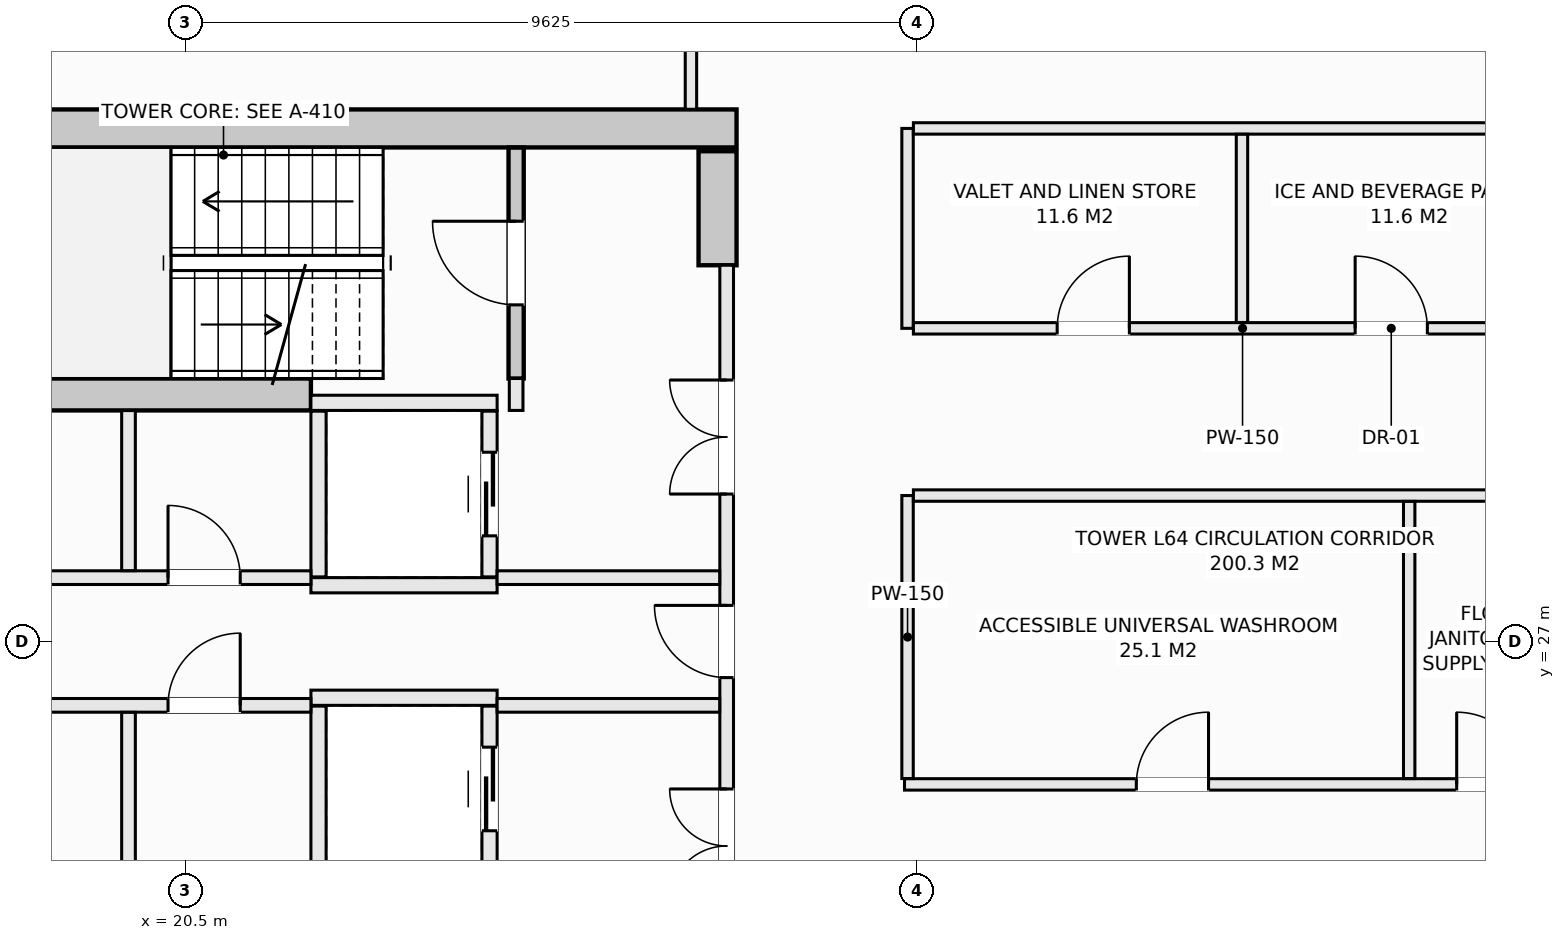
"""IFC4 building model, lengths in metres.
Left out: names, types, materials, properties, quantities, classifications, styles, units other than length and angle.
Written with IfcOpenShell. Run it as: python <this file> out.ifc"""

import sys

from ifc_helpers import new_model, si_unit, direction, frame, frame_2d, origin, place, context, subcontext, project, spatial, rectangle, extrude, element, fill, save


model = new_model("IFC4")
c1 = context("Model", 3, precision=1e-05, world=origin(), true_north=direction((0.0, 1.0)))
c2 = subcontext(c1, "Body", "Model", "MODEL_VIEW")
j1 = project(units=[si_unit("LENGTHUNIT", "METRE"), si_unit("PLANEANGLEUNIT", "RADIAN")], contexts=[c1])
p1 = place(None, origin())
s1 = spatial("IfcSite", under=j1, at=p1, CompositionType="ELEMENT")
p2 = place(p1, origin())
s2 = spatial("IfcBuilding", under=s1, at=p2, CompositionType="ELEMENT")
p3 = place(p2, frame((0.0, 0.0, 239.3)))
s3 = spatial("IfcBuildingStorey", under=s2, at=p3, CompositionType="ELEMENT", Elevation=239.3)
p4 = place(p3, frame((14.25, 33.75, -0.27), z_axis=(0.0, 0.0, 1.0), x_axis=(1.0, 0.0, 0.0)))
e1 = element("IfcWall", 1, at=p4, inside=s3, PredefinedType="SHEAR", context=c2, shape_type="SweptSolid", body=[
    extrude(rectangle(XDim=13.5, YDim=0.5, at=frame_2d((6.75, 0.0))), origin(), (0.0, 0.0, 1.0), 3.3),
])
p5 = place(p3, frame((27.5, 31.95, -0.27), z_axis=(0.0, 0.0, 1.0), x_axis=(0.0, 1.0, 0.0)))
e2 = element("IfcWall", 2, at=p5, inside=s3, PredefinedType="SHEAR", context=c2, shape_type="SweptSolid", body=[
    extrude(rectangle(XDim=1.5, YDim=0.5, at=frame_2d((0.75, 0.0))), origin(), (0.0, 0.0, 1.0), 3.3),
])
p6 = place(p3, frame((14.85, 30.25, -0.27), z_axis=(0.0, 0.0, 1.0), x_axis=(1.0, 0.0, 0.0)))
e3 = element("IfcWall", 3, at=p6, inside=s3, PredefinedType="SHEAR", context=c2, shape_type="SweptSolid", body=[
    extrude(rectangle(XDim=7.3, YDim=0.42, at=frame_2d((3.65, 0.0))), origin(), (0.0, 0.0, 1.0), 3.3),
])
p7 = place(p3, frame((24.85, 30.46, -0.27), z_axis=(0.0, 0.0, 1.0), x_axis=(0.0, 1.0, 0.0)))
e4 = element("IfcWall", 4, at=p7, inside=s3, PredefinedType="SHEAR", context=c2, shape_type="SweptSolid", body=[
    extrude(rectangle(XDim=3.038, YDim=0.2, at=frame_2d((1.519, 0.0))), origin(), (0.0, 0.0, 1.0), 3.3),
])
p8 = place(p7, frame((0.969, 0.0, 0.27)))
e5 = element("IfcOpeningElement", 5, at=p8, cuts=e4, PredefinedType="OPENING", context=c2, shape_type="SweptSolid", body=[
    extrude(rectangle(XDim=1.1, YDim=2.15, at=frame_2d((0.55, 1.075))), frame((0.0, 0.11, 0.0), z_axis=(0.0, -1.0, 0.0), x_axis=(1.0, 0.0, 0.0)), (0.0, 0.0, 1.0), 0.22),
])
for number, where, z_axis, x_axis in (
    (6, (22.15, 30.14, 0.0), (0.0, 0.0, 1.0), (1.0, 0.0, 0.0)),
    (7, (22.15, 27.74, 0.0), (0.0, 0.0, 1.0), (1.0, 0.0, 0.0)),
):
    element("IfcWall", number, at=place(p3, frame(where, z_axis=z_axis, x_axis=x_axis)), inside=s3, PredefinedType="SOLIDWALL", context=c2, shape_type="SweptSolid", body=[
        extrude(rectangle(XDim=2.45, YDim=0.2, at=frame_2d((1.225, 0.0))), origin(), (0.0, 0.0, 1.0), 3.03),
    ])
p9 = place(p3, frame((22.25, 27.85, 0.0), z_axis=(0.0, 0.0, 1.0), x_axis=(0.0, 1.0, 0.0)))
e8 = element("IfcWall", 8, at=p9, inside=s3, PredefinedType="SOLIDWALL", context=c2, shape_type="SweptSolid", body=[
    extrude(rectangle(XDim=2.18, YDim=0.2, at=frame_2d((1.09, 0.0))), origin(), (0.0, 0.0, 1.0), 3.03),
])
p10 = place(p3, frame((24.5, 27.85, 0.0), z_axis=(0.0, 0.0, 1.0), x_axis=(0.0, 1.0, 0.0)))
e9 = element("IfcWall", 9, at=p10, inside=s3, PredefinedType="SOLIDWALL", context=c2, shape_type="SweptSolid", body=[
    extrude(rectangle(XDim=2.18, YDim=0.2, at=frame_2d((1.09, 0.0))), origin(), (0.0, 0.0, 1.0), 3.03),
])
p11 = place(p10, frame((0.54, 0.0, 0.0)))
e10 = element("IfcOpeningElement", 10, at=p11, cuts=e9, PredefinedType="OPENING", context=c2, shape_type="SweptSolid", body=[
    extrude(rectangle(XDim=1.1, YDim=2.2, at=frame_2d((0.55, 1.1))), frame((0.0, 0.11, 0.0), z_axis=(0.0, -1.0, 0.0), x_axis=(1.0, 0.0, 0.0)), (0.0, 0.0, 1.0), 0.22),
])
p12 = place(p3, frame((22.15, 26.26, 0.0), z_axis=(0.0, 0.0, 1.0), x_axis=(1.0, 0.0, 0.0)))
e11 = element("IfcWall", 11, at=p12, inside=s3, PredefinedType="SOLIDWALL", context=c2, shape_type="SweptSolid", body=[
    extrude(rectangle(XDim=2.45, YDim=0.2, at=frame_2d((1.225, 0.0))), origin(), (0.0, 0.0, 1.0), 3.03),
])
p13 = place(p3, frame((22.25, 23.97, 0.0), z_axis=(0.0, 0.0, 1.0), x_axis=(0.0, 1.0, 0.0)))
e12 = element("IfcWall", 12, at=p13, inside=s3, PredefinedType="SOLIDWALL", context=c2, shape_type="SweptSolid", body=[
    extrude(rectangle(XDim=2.18, YDim=0.2, at=frame_2d((1.09, 0.0))), origin(), (0.0, 0.0, 1.0), 3.03),
])
p14 = place(p3, frame((24.5, 23.97, 0.0), z_axis=(0.0, 0.0, 1.0), x_axis=(0.0, 1.0, 0.0)))
e13 = element("IfcWall", 13, at=p14, inside=s3, PredefinedType="SOLIDWALL", context=c2, shape_type="SweptSolid", body=[
    extrude(rectangle(XDim=2.18, YDim=0.2, at=frame_2d((1.09, 0.0))), origin(), (0.0, 0.0, 1.0), 3.03),
])
p15 = place(p14, frame((0.54, 0.0, 0.0)))
e14 = element("IfcOpeningElement", 14, at=p15, cuts=e13, PredefinedType="OPENING", context=c2, shape_type="SweptSolid", body=[
    extrude(rectangle(XDim=1.1, YDim=2.2, at=frame_2d((0.55, 1.1))), frame((0.0, 0.11, 0.0), z_axis=(0.0, -1.0, 0.0), x_axis=(1.0, 0.0, 0.0)), (0.0, 0.0, 1.0), 0.22),
])
p16 = place(p3, frame((24.85, 30.04, 0.0), z_axis=(0.0, 0.0, 1.0), x_axis=(0.0, 1.0, 0.0)))
e15 = element("IfcWall", 15, at=p16, inside=s3, PredefinedType="SOLIDWALL", context=c2, shape_type="SweptSolid", body=[
    extrude(rectangle(XDim=0.42, YDim=0.18, at=frame_2d((0.21, 0.0))), origin(), (0.0, 0.0, 1.0), 3.03),
])
p17 = place(p3, frame((27.62, 22.05, 0.0), z_axis=(0.0, 0.0, 1.0), x_axis=(0.0, 1.0, 0.0)))
e16 = element("IfcWall", 16, at=p17, inside=s3, PredefinedType="SOLIDWALL", context=c2, shape_type="SweptSolid", body=[
    extrude(rectangle(XDim=9.9, YDim=0.18, at=frame_2d((4.95, 0.0))), origin(), (0.0, 0.0, 1.0), 3.03),
])
p18 = place(p17, frame((4.475, 0.0, 0.0)))
e17 = element("IfcOpeningElement", 17, at=p18, cuts=e16, PredefinedType="OPENING", context=c2, shape_type="SweptSolid", body=[
    extrude(rectangle(XDim=0.95, YDim=2.1, at=frame_2d((0.475, 1.05))), frame((0.0, 0.1, 0.0), z_axis=(0.0, -1.0, 0.0), x_axis=(1.0, 0.0, 0.0)), (0.0, 0.0, 1.0), 0.2),
])
p19 = place(p17, frame((6.89, 0.0, 0.0)))
e18 = element("IfcOpeningElement", 18, at=p19, cuts=e16, PredefinedType="OPENING", context=c2, shape_type="SweptSolid", body=[
    extrude(rectangle(XDim=1.5, YDim=2.2, at=frame_2d((0.75, 1.1))), frame((0.0, 0.1, 0.0), z_axis=(0.0, -1.0, 0.0), x_axis=(1.0, 0.0, 0.0)), (0.0, 0.0, 1.0), 0.2),
])
p20 = place(p17, frame((1.51, 0.0, 0.0)))
e19 = element("IfcOpeningElement", 19, at=p20, cuts=e16, PredefinedType="OPENING", context=c2, shape_type="SweptSolid", body=[
    extrude(rectangle(XDim=1.5, YDim=2.2, at=frame_2d((0.75, 1.1))), frame((0.0, 0.1, 0.0), z_axis=(0.0, -1.0, 0.0), x_axis=(1.0, 0.0, 0.0)), (0.0, 0.0, 1.0), 0.2),
])
p21 = place(p3, frame((15.25, 27.84, 0.0), z_axis=(0.0, 0.0, 1.0), x_axis=(1.0, 0.0, 0.0)))
e20 = element("IfcWall", 20, at=p21, inside=s3, PredefinedType="SOLIDWALL", context=c2, shape_type="SweptSolid", body=[
    extrude(rectangle(XDim=6.9, YDim=0.18, at=frame_2d((3.45, 0.0))), origin(), (0.0, 0.0, 1.0), 3.03),
])
p22 = place(p21, frame((5.02, 0.0, 0.0)))
e21 = element("IfcOpeningElement", 21, at=p22, cuts=e20, PredefinedType="OPENING", context=c2, shape_type="SweptSolid", body=[
    extrude(rectangle(XDim=0.95, YDim=2.1, at=frame_2d((0.475, 1.05))), frame((0.0, 0.1, 0.0), z_axis=(0.0, -1.0, 0.0), x_axis=(1.0, 0.0, 0.0)), (0.0, 0.0, 1.0), 0.2),
])
p23 = place(p21, frame((1.98, 0.0, 0.0)))
e22 = element("IfcOpeningElement", 22, at=p23, cuts=e20, PredefinedType="OPENING", context=c2, shape_type="SweptSolid", body=[
    extrude(rectangle(XDim=0.95, YDim=2.1, at=frame_2d((0.475, 1.05))), frame((0.0, 0.1, 0.0), z_axis=(0.0, -1.0, 0.0), x_axis=(1.0, 0.0, 0.0)), (0.0, 0.0, 1.0), 0.2),
])
p24 = place(p3, frame((24.6, 27.84, 0.0), z_axis=(0.0, 0.0, 1.0), x_axis=(1.0, 0.0, 0.0)))
e23 = element("IfcWall", 23, at=p24, inside=s3, PredefinedType="SOLIDWALL", context=c2, shape_type="SweptSolid", body=[
    extrude(rectangle(XDim=2.928, YDim=0.18, at=frame_2d((1.464, 0.0))), origin(), (0.0, 0.0, 1.0), 3.03),
])
p25 = place(p3, frame((15.25, 26.16, 0.0), z_axis=(0.0, 0.0, 1.0), x_axis=(1.0, 0.0, 0.0)))
e24 = element("IfcWall", 24, at=p25, inside=s3, PredefinedType="SOLIDWALL", context=c2, shape_type="SweptSolid", body=[
    extrude(rectangle(XDim=6.9, YDim=0.18, at=frame_2d((3.45, 0.0))), origin(), (0.0, 0.0, 1.0), 3.03),
])
p26 = place(p25, frame((5.02, 0.0, 0.0)))
e25 = element("IfcOpeningElement", 25, at=p26, cuts=e24, PredefinedType="OPENING", context=c2, shape_type="SweptSolid", body=[
    extrude(rectangle(XDim=0.95, YDim=2.1, at=frame_2d((0.475, 1.05))), frame((0.0, 0.1, 0.0), z_axis=(0.0, -1.0, 0.0), x_axis=(1.0, 0.0, 0.0)), (0.0, 0.0, 1.0), 0.2),
])
p27 = place(p25, frame((1.98, 0.0, 0.0)))
e26 = element("IfcOpeningElement", 26, at=p27, cuts=e24, PredefinedType="OPENING", context=c2, shape_type="SweptSolid", body=[
    extrude(rectangle(XDim=0.95, YDim=2.1, at=frame_2d((0.475, 1.05))), frame((0.0, 0.1, 0.0), z_axis=(0.0, -1.0, 0.0), x_axis=(1.0, 0.0, 0.0)), (0.0, 0.0, 1.0), 0.2),
])
p28 = place(p3, frame((24.6, 26.16, 0.0), z_axis=(0.0, 0.0, 1.0), x_axis=(1.0, 0.0, 0.0)))
e27 = element("IfcWall", 27, at=p28, inside=s3, PredefinedType="SOLIDWALL", context=c2, shape_type="SweptSolid", body=[
    extrude(rectangle(XDim=2.928, YDim=0.18, at=frame_2d((1.464, 0.0))), origin(), (0.0, 0.0, 1.0), 3.03),
])
for number, where, z_axis, x_axis in (
    (28, (19.75, 23.962, 0.0), (0.0, 0.0, 1.0), (0.0, 1.0, 0.0)),
    (29, (19.75, 27.932, 0.0), (0.0, 0.0, 1.0), (0.0, 1.0, 0.0)),
):
    element("IfcWall", number, at=place(p3, frame(where, z_axis=z_axis, x_axis=x_axis)), inside=s3, PredefinedType="SOLIDWALL", context=c2, shape_type="SweptSolid", body=[
        extrude(rectangle(XDim=2.106, YDim=0.18, at=frame_2d((1.053, 0.0))), origin(), (0.0, 0.0, 1.0), 3.03),
    ])
p29 = place(p3, frame((27.15, 34.002, 0.0), z_axis=(0.0, 0.0, 1.0), x_axis=(0.0, 1.0, 0.0)))
e30 = element("IfcWall", 30, at=p29, inside=s3, PredefinedType="PARTITIONING", context=c2, shape_type="SweptSolid", body=[
    extrude(rectangle(XDim=4.198, YDim=0.15, at=frame_2d((2.099, 0.0))), origin(), (0.0, 0.0, 1.0), 3.03),
])
p30 = place(p29, frame((1.998, 0.0, 0.0)))
e31 = element("IfcOpeningElement", 31, at=p30, cuts=e30, PredefinedType="OPENING", context=c2, shape_type="SweptSolid", body=[
    extrude(rectangle(XDim=0.95, YDim=2.1, at=frame_2d((0.475, 1.05))), frame((0.0, 0.085, 0.0), z_axis=(0.0, -1.0, 0.0), x_axis=(1.0, 0.0, 0.0)), (0.0, 0.0, 1.0), 0.17),
])
p31 = place(p3, frame((29.96, 25.12, 0.0), z_axis=(0.0, 0.0, 1.0), x_axis=(1.0, 0.0, 0.0)))
e32 = element("IfcWall", 32, at=p31, inside=s3, PredefinedType="PARTITIONING", context=c2, shape_type="SweptSolid", body=[
    extrude(rectangle(XDim=9.64, YDim=0.15, at=frame_2d((4.82, 0.0))), origin(), (0.0, 0.0, 1.0), 3.03),
])
p32 = place(p31, frame((3.05, 0.0, 0.0)))
e33 = element("IfcOpeningElement", 33, at=p32, cuts=e32, PredefinedType="OPENING", context=c2, shape_type="SweptSolid", body=[
    extrude(rectangle(XDim=0.95, YDim=2.1, at=frame_2d((0.475, 1.05))), frame((0.0, 0.085, 0.0), z_axis=(0.0, -1.0, 0.0), x_axis=(1.0, 0.0, 0.0)), (0.0, 0.0, 1.0), 0.17),
])
p33 = place(p31, frame((7.265, 0.0, 0.0)))
e34 = element("IfcOpeningElement", 34, at=p33, cuts=e32, PredefinedType="OPENING", context=c2, shape_type="SweptSolid", body=[
    extrude(rectangle(XDim=0.95, YDim=2.1, at=frame_2d((0.475, 1.05))), frame((0.0, 0.085, 0.0), z_axis=(0.0, -1.0, 0.0), x_axis=(1.0, 0.0, 0.0)), (0.0, 0.0, 1.0), 0.17),
])
p34 = place(p3, frame((30.0, 25.197, 0.0), z_axis=(0.0, 0.0, 1.0), x_axis=(0.0, 1.0, 0.0)))
e35 = element("IfcWall", 35, at=p34, inside=s3, PredefinedType="PARTITIONING", context=c2, shape_type="SweptSolid", body=[
    extrude(rectangle(XDim=3.723, YDim=0.15, at=frame_2d((1.861, 0.0))), origin(), (0.0, 0.0, 1.0), 3.03),
])
p35 = place(p3, frame((30.0, 31.12, 0.0), z_axis=(0.0, 0.0, 1.0), x_axis=(0.0, 1.0, 0.0)))
e36 = element("IfcWall", 36, at=p35, inside=s3, PredefinedType="PARTITIONING", context=c2, shape_type="SweptSolid", body=[
    extrude(rectangle(XDim=2.63, YDim=0.15, at=frame_2d((1.315, 0.0))), origin(), (0.0, 0.0, 1.0), 3.03),
])
p36 = place(p3, frame((30.077, 28.92, 0.0), z_axis=(0.0, 0.0, 1.0), x_axis=(1.0, 0.0, 0.0)))
e37 = element("IfcWall", 37, at=p36, inside=s3, PredefinedType="PARTITIONING", context=c2, shape_type="SweptSolid", body=[
    extrude(rectangle(XDim=9.523, YDim=0.15, at=frame_2d((4.762, 0.0))), origin(), (0.0, 0.0, 1.0), 3.03),
])
p37 = place(p3, frame((36.6, 25.197, 0.0), z_axis=(0.0, 0.0, 1.0), x_axis=(0.0, 1.0, 0.0)))
e38 = element("IfcWall", 38, at=p37, inside=s3, PredefinedType="PARTITIONING", context=c2, shape_type="SweptSolid", body=[
    extrude(rectangle(XDim=3.646, YDim=0.15, at=frame_2d((1.823, 0.0))), origin(), (0.0, 0.0, 1.0), 3.03),
])
p38 = place(p3, frame((30.077, 31.12, 0.0), z_axis=(0.0, 0.0, 1.0), x_axis=(1.0, 0.0, 0.0)))
e39 = element("IfcWall", 39, at=p38, inside=s3, PredefinedType="PARTITIONING", context=c2, shape_type="SweptSolid", body=[
    extrude(rectangle(XDim=8.661, YDim=0.15, at=frame_2d((4.331, 0.0))), origin(), (0.0, 0.0, 1.0), 3.03),
])
p39 = place(p38, frame((1.892, 0.0, 0.0)))
e40 = element("IfcOpeningElement", 40, at=p39, cuts=e39, PredefinedType="OPENING", context=c2, shape_type="SweptSolid", body=[
    extrude(rectangle(XDim=0.95, YDim=2.1, at=frame_2d((0.475, 1.05))), frame((0.0, 0.085, 0.0), z_axis=(0.0, -1.0, 0.0), x_axis=(1.0, 0.0, 0.0)), (0.0, 0.0, 1.0), 0.17),
])
p40 = place(p38, frame((5.812, 0.0, 0.0)))
e41 = element("IfcOpeningElement", 41, at=p40, cuts=e39, PredefinedType="OPENING", context=c2, shape_type="SweptSolid", body=[
    extrude(rectangle(XDim=0.95, YDim=2.1, at=frame_2d((0.475, 1.05))), frame((0.0, 0.085, 0.0), z_axis=(0.0, -1.0, 0.0), x_axis=(1.0, 0.0, 0.0)), (0.0, 0.0, 1.0), 0.17),
])
p41 = place(p3, frame((30.077, 33.75, 0.0), z_axis=(0.0, 0.0, 1.0), x_axis=(1.0, 0.0, 0.0)))
e42 = element("IfcWall", 42, at=p41, inside=s3, PredefinedType="PARTITIONING", context=c2, shape_type="SweptSolid", body=[
    extrude(rectangle(XDim=8.661, YDim=0.15, at=frame_2d((4.331, 0.0))), origin(), (0.0, 0.0, 1.0), 3.03),
])
p42 = place(p3, frame((34.4, 31.197, 0.0), z_axis=(0.0, 0.0, 1.0), x_axis=(0.0, 1.0, 0.0)))
e43 = element("IfcWall", 43, at=p42, inside=s3, PredefinedType="PARTITIONING", context=c2, shape_type="SweptSolid", body=[
    extrude(rectangle(XDim=2.476, YDim=0.15, at=frame_2d((1.238, 0.0))), origin(), (0.0, 0.0, 1.0), 3.03),
])
p43 = place(p8, origin())
e44 = element("IfcDoor", 44, at=p43, inside=s3, OperationType="SINGLE_SWING_RIGHT", PredefinedType="DOOR", context=c2, shape_type="SweptSolid", body=[
    extrude(rectangle(XDim=1.1, YDim=2.15, at=frame_2d((0.55, 1.075))), frame((0.0, 0.025, 0.0), z_axis=(0.0, -1.0, 0.0), x_axis=(1.0, 0.0, 0.0)), (0.0, 0.0, 1.0), 0.05),
])
fill(e5, e44)
p44 = place(p11, origin())
e45 = element("IfcDoor", 45, at=p44, inside=s3, OperationType="SLIDING_TO_LEFT", PredefinedType="DOOR", context=c2, shape_type="SweptSolid", body=[
    extrude(rectangle(XDim=1.1, YDim=2.2, at=frame_2d((0.55, 1.1))), frame((0.0, 0.025, 0.0), z_axis=(0.0, -1.0, 0.0), x_axis=(1.0, 0.0, 0.0)), (0.0, 0.0, 1.0), 0.05),
])
fill(e10, e45)
p45 = place(p15, origin())
e46 = element("IfcDoor", 46, at=p45, inside=s3, OperationType="SLIDING_TO_LEFT", PredefinedType="DOOR", context=c2, shape_type="SweptSolid", body=[
    extrude(rectangle(XDim=1.1, YDim=2.2, at=frame_2d((0.55, 1.1))), frame((0.0, 0.025, 0.0), z_axis=(0.0, -1.0, 0.0), x_axis=(1.0, 0.0, 0.0)), (0.0, 0.0, 1.0), 0.05),
])
fill(e14, e46)
p46 = place(p18, origin())
e47 = element("IfcDoor", 47, at=p46, inside=s3, OperationType="SINGLE_SWING_RIGHT", PredefinedType="DOOR", context=c2, shape_type="SweptSolid", body=[
    extrude(rectangle(XDim=0.95, YDim=2.1, at=frame_2d((0.475, 1.05))), frame((0.0, 0.025, 0.0), z_axis=(0.0, -1.0, 0.0), x_axis=(1.0, 0.0, 0.0)), (0.0, 0.0, 1.0), 0.05),
])
fill(e17, e47)
p47 = place(p19, origin())
e48 = element("IfcDoor", 48, at=p47, inside=s3, OperationType="DOUBLE_DOOR_SINGLE_SWING", PredefinedType="DOOR", context=c2, shape_type="SweptSolid", body=[
    extrude(rectangle(XDim=1.5, YDim=2.2, at=frame_2d((0.75, 1.1))), frame((0.0, 0.025, 0.0), z_axis=(0.0, -1.0, 0.0), x_axis=(1.0, 0.0, 0.0)), (0.0, 0.0, 1.0), 0.05),
])
fill(e18, e48)
p48 = place(p20, origin())
e49 = element("IfcDoor", 49, at=p48, inside=s3, OperationType="DOUBLE_DOOR_SINGLE_SWING", PredefinedType="DOOR", context=c2, shape_type="SweptSolid", body=[
    extrude(rectangle(XDim=1.5, YDim=2.2, at=frame_2d((0.75, 1.1))), frame((0.0, 0.025, 0.0), z_axis=(0.0, -1.0, 0.0), x_axis=(1.0, 0.0, 0.0)), (0.0, 0.0, 1.0), 0.05),
])
fill(e19, e49)
p49 = place(p22, origin())
e50 = element("IfcDoor", 50, at=p49, inside=s3, OperationType="SINGLE_SWING_LEFT", PredefinedType="DOOR", context=c2, shape_type="SweptSolid", body=[
    extrude(rectangle(XDim=0.95, YDim=2.1, at=frame_2d((0.475, 1.05))), frame((0.0, 0.025, 0.0), z_axis=(0.0, -1.0, 0.0), x_axis=(1.0, 0.0, 0.0)), (0.0, 0.0, 1.0), 0.05),
])
fill(e21, e50)
p50 = place(p26, origin())
e51 = element("IfcDoor", 51, at=p50, inside=s3, OperationType="SINGLE_SWING_RIGHT", PredefinedType="DOOR", context=c2, shape_type="SweptSolid", body=[
    extrude(rectangle(XDim=0.95, YDim=2.1, at=frame_2d((0.475, 1.05))), frame((0.0, 0.025, 0.0), z_axis=(0.0, -1.0, 0.0), x_axis=(1.0, 0.0, 0.0)), (0.0, 0.0, 1.0), 0.05),
])
fill(e25, e51)
p51 = place(p32, origin())
e52 = element("IfcDoor", 52, at=p51, inside=s3, OperationType="SINGLE_SWING_RIGHT", PredefinedType="DOOR", context=c2, shape_type="SweptSolid", body=[
    extrude(rectangle(XDim=0.95, YDim=2.1, at=frame_2d((0.475, 1.05))), frame((0.0, 0.025, 0.0), z_axis=(0.0, -1.0, 0.0), x_axis=(1.0, 0.0, 0.0)), (0.0, 0.0, 1.0), 0.05),
])
fill(e33, e52)
p52 = place(p33, origin())
e53 = element("IfcDoor", 53, at=p52, inside=s3, OperationType="SINGLE_SWING_LEFT", PredefinedType="DOOR", context=c2, shape_type="SweptSolid", body=[
    extrude(rectangle(XDim=0.95, YDim=2.1, at=frame_2d((0.475, 1.05))), frame((0.0, 0.025, 0.0), z_axis=(0.0, -1.0, 0.0), x_axis=(1.0, 0.0, 0.0)), (0.0, 0.0, 1.0), 0.05),
])
fill(e34, e53)
p53 = place(p39, origin())
e54 = element("IfcDoor", 54, at=p53, inside=s3, OperationType="SINGLE_SWING_RIGHT", PredefinedType="DOOR", context=c2, shape_type="SweptSolid", body=[
    extrude(rectangle(XDim=0.95, YDim=2.1, at=frame_2d((0.475, 1.05))), frame((0.0, 0.025, 0.0), z_axis=(0.0, -1.0, 0.0), x_axis=(1.0, 0.0, 0.0)), (0.0, 0.0, 1.0), 0.05),
])
fill(e40, e54)
p54 = place(p40, origin())
e55 = element("IfcDoor", 55, at=p54, inside=s3, OperationType="SINGLE_SWING_LEFT", PredefinedType="DOOR", context=c2, shape_type="SweptSolid", body=[
    extrude(rectangle(XDim=0.95, YDim=2.1, at=frame_2d((0.475, 1.05))), frame((0.0, 0.025, 0.0), z_axis=(0.0, -1.0, 0.0), x_axis=(1.0, 0.0, 0.0)), (0.0, 0.0, 1.0), 0.05),
])
fill(e41, e55)
save(model, sys.argv[1])
